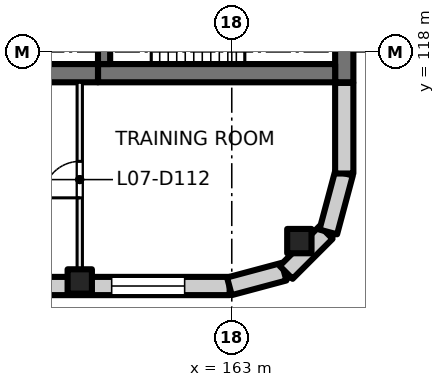
"""IFC4 building model, lengths in metres.
Left out: names, types, materials, properties, quantities, classifications, styles, units other than length and angle.
Written with IfcOpenShell. Run it as: python <this file> out.ifc"""

import sys

from ifc_helpers import new_model, si_unit, direction, frame, frame_2d, origin, origin_2d, place, context, subcontext, project, spatial, rectangle, extrude, element, fill, save


model = new_model("IFC4")
c1 = context("Model", 3, precision=1e-05, world=origin(), true_north=direction((0.0, 1.0)))
c2 = subcontext(c1, "Body", "Model", "MODEL_VIEW")
j1 = project(units=[si_unit("LENGTHUNIT", "METRE"), si_unit("PLANEANGLEUNIT", "RADIAN")], contexts=[c1])
p1 = place(None, origin())
s1 = spatial("IfcSite", under=j1, at=p1, CompositionType="ELEMENT")
p2 = place(p1, origin())
s2 = spatial("IfcBuilding", under=s1, at=p2, CompositionType="ELEMENT")
p3 = place(p2, frame((0.0, 0.0, 35.5)))
s3 = spatial("IfcBuildingStorey", under=s2, at=p3, CompositionType="ELEMENT", Elevation=35.5)
for number, where, z_axis, x_axis in (
    (1, (165.223, 111.777, 0.0), (0.0, 0.0, 1.0), (1.0, 0.0, 0.0)),
    (2, (158.0, 110.45, 0.0), (0.0, 0.0, 1.0), (1.0, 0.0, 0.0)),
):
    element("IfcColumn", number, at=place(p3, frame(where, z_axis=z_axis, x_axis=x_axis)), inside=s3, PredefinedType="COLUMN", context=c2, shape_type="SweptSolid", body=[
        extrude(rectangle(XDim=0.8, YDim=0.8, at=origin_2d()), origin(), (0.0, 0.0, 1.0), 4.0),
    ])
p4 = place(p3, frame((166.7, 120.8, 0.0), z_axis=(0.0, 0.0, 1.0), x_axis=(0.0, -1.0, 0.0)))
e3 = element("IfcWall", 3, at=p4, inside=s3, PredefinedType="SHEAR", context=c2, shape_type="SweptSolid", body=[
    extrude(rectangle(XDim=3.8, YDim=0.6, at=frame_2d((1.9, 0.0))), origin(), (0.0, 0.0, 1.0), 4.0),
])
p5 = place(p3, frame((166.4, 117.3, 0.0), z_axis=(0.0, 0.0, 1.0), x_axis=(-1.0, 0.0, 0.0)))
e4 = element("IfcWall", 4, at=p5, inside=s3, PredefinedType="SHEAR", context=c2, shape_type="SweptSolid", body=[
    extrude(rectangle(XDim=7.8, YDim=0.6, at=frame_2d((3.9, 0.0))), origin(), (0.0, 0.0, 1.0), 4.0),
])
p6 = place(p3, frame((158.6, 117.3, 0.0), z_axis=(0.0, 0.0, 1.0), x_axis=(-1.0, 0.0, 0.0)))
e5 = element("IfcWall", 5, at=p6, inside=s3, PredefinedType="SHEAR", context=c2, shape_type="SweptSolid", body=[
    extrude(rectangle(XDim=4.6, YDim=0.6, at=frame_2d((2.3, 0.0))), origin(), (0.0, 0.0, 1.0), 4.0),
])
p7 = place(p3, frame((158.8, 120.4, 0.0), z_axis=(0.0, 0.0, 1.0), x_axis=(0.0, -1.0, 0.0)))
e6 = element("IfcWall", 6, at=p7, inside=s3, PredefinedType="SHEAR", context=c2, shape_type="SweptSolid", body=[
    extrude(rectangle(XDim=2.8, YDim=0.4, at=frame_2d((1.4, 0.0))), origin(), (0.0, 0.0, 1.0), 4.0),
])
p8 = place(p7, frame((0.9, 0.0, 0.0)))
e7 = element("IfcOpeningElement", 7, at=p8, cuts=e6, PredefinedType="OPENING", context=c2, shape_type="SweptSolid", body=[
    extrude(rectangle(XDim=1.0, YDim=2.1, at=frame_2d((0.5, 1.05))), frame((0.0, 0.21, 0.0), z_axis=(0.0, -1.0, 0.0), x_axis=(1.0, 0.0, 0.0)), (0.0, 0.0, 1.0), 0.42),
])
p9 = place(p3, frame((162.93, 110.3, 0.0), z_axis=(0.0, 0.0, 1.0), x_axis=(-1.0, 0.0, 0.0)))
e8 = element("IfcWall", 8, at=p9, inside=s3, PredefinedType="SOLIDWALL", context=c2, shape_type="SweptSolid", body=[
    extrude(rectangle(XDim=31.93, YDim=0.6, at=frame_2d((15.965, 0.0))), origin(), (0.0, 0.0, 1.0), 3.625),
])
p10 = place(p9, frame((1.48, 0.0, 0.9)))
e9 = element("IfcOpeningElement", 9, at=p10, cuts=e8, PredefinedType="OPENING", context=c2, shape_type="SweptSolid", body=[
    extrude(rectangle(XDim=2.4, YDim=2.4, at=frame_2d((1.2, 1.2))), frame((0.0, 0.31, 0.0), z_axis=(0.0, -1.0, 0.0), x_axis=(1.0, 0.0, 0.0)), (0.0, 0.0, 1.0), 0.62),
])
p11 = place(p9, frame((5.98, 0.0, 0.9)))
e10 = element("IfcOpeningElement", 10, at=p11, cuts=e8, PredefinedType="OPENING", context=c2, shape_type="SweptSolid", body=[
    extrude(rectangle(XDim=2.4, YDim=2.4, at=frame_2d((1.2, 1.2))), frame((0.0, 0.31, 0.0), z_axis=(0.0, -1.0, 0.0), x_axis=(1.0, 0.0, 0.0)), (0.0, 0.0, 1.0), 0.62),
])
p12 = place(p9, frame((10.48, 0.0, 0.9)))
e11 = element("IfcOpeningElement", 11, at=p12, cuts=e8, PredefinedType="OPENING", context=c2, shape_type="SweptSolid", body=[
    extrude(rectangle(XDim=2.4, YDim=2.4, at=frame_2d((1.2, 1.2))), frame((0.0, 0.31, 0.0), z_axis=(0.0, -1.0, 0.0), x_axis=(1.0, 0.0, 0.0)), (0.0, 0.0, 1.0), 0.62),
])
p13 = place(p9, frame((14.98, 0.0, 0.9)))
e12 = element("IfcOpeningElement", 12, at=p13, cuts=e8, PredefinedType="OPENING", context=c2, shape_type="SweptSolid", body=[
    extrude(rectangle(XDim=2.4, YDim=2.4, at=frame_2d((1.2, 1.2))), frame((0.0, 0.31, 0.0), z_axis=(0.0, -1.0, 0.0), x_axis=(1.0, 0.0, 0.0)), (0.0, 0.0, 1.0), 0.62),
])
p14 = place(p9, frame((19.48, 0.0, 0.9)))
e13 = element("IfcOpeningElement", 13, at=p14, cuts=e8, PredefinedType="OPENING", context=c2, shape_type="SweptSolid", body=[
    extrude(rectangle(XDim=2.4, YDim=2.4, at=frame_2d((1.2, 1.2))), frame((0.0, 0.31, 0.0), z_axis=(0.0, -1.0, 0.0), x_axis=(1.0, 0.0, 0.0)), (0.0, 0.0, 1.0), 0.62),
])
p15 = place(p9, frame((23.98, 0.0, 0.9)))
e14 = element("IfcOpeningElement", 14, at=p15, cuts=e8, PredefinedType="OPENING", context=c2, shape_type="SweptSolid", body=[
    extrude(rectangle(XDim=2.4, YDim=2.4, at=frame_2d((1.2, 1.2))), frame((0.0, 0.31, 0.0), z_axis=(0.0, -1.0, 0.0), x_axis=(1.0, 0.0, 0.0)), (0.0, 0.0, 1.0), 0.62),
])
p16 = place(p9, frame((28.48, 0.0, 0.9)))
e15 = element("IfcOpeningElement", 15, at=p16, cuts=e8, PredefinedType="OPENING", context=c2, shape_type="SweptSolid", body=[
    extrude(rectangle(XDim=2.4, YDim=2.4, at=frame_2d((1.2, 1.2))), frame((0.0, 0.31, 0.0), z_axis=(0.0, -1.0, 0.0), x_axis=(1.0, 0.0, 0.0)), (0.0, 0.0, 1.0), 0.62),
])
for number, where, z_axis, x_axis in (
    (16, (164.719, 110.771, 0.0), (0.0, 0.0, 1.0), (-0.966, -0.259, 0.0)),
    (17, (166.104, 112.064, 0.0), (0.0, 0.0, 1.0), (-0.707, -0.707, 0.0)),
):
    element("IfcWall", number, at=place(p3, frame(where, z_axis=z_axis, x_axis=x_axis)), inside=s3, PredefinedType="SOLIDWALL", context=c2, shape_type="SweptSolid", body=[
        extrude(rectangle(XDim=1.861, YDim=0.6, at=frame_2d((0.93, 0.0))), origin(), (0.0, 0.0, 1.0), 3.625),
    ])
p17 = place(p3, frame((166.692, 114.01, 0.0), z_axis=(0.0, 0.0, 1.0), x_axis=(-0.258839784042, -0.965920269068, 0.0)))
e18 = element("IfcWall", 18, at=p17, inside=s3, PredefinedType="SOLIDWALL", context=c2, shape_type="SweptSolid", body=[
    extrude(rectangle(XDim=2.0, YDim=0.6, at=frame_2d((1.0, 0.0))), origin(), (0.0, 0.0, 1.0), 3.625),
])
p18 = place(p3, frame((166.7, 116.98, 0.0), z_axis=(0.0, 0.0, 1.0), x_axis=(0.0, -1.0, 0.0)))
e19 = element("IfcWall", 19, at=p18, inside=s3, PredefinedType="SOLIDWALL", context=c2, shape_type="SweptSolid", body=[
    extrude(rectangle(XDim=2.98, YDim=0.6, at=frame_2d((1.49, 0.0))), origin(), (0.0, 0.0, 1.0), 3.625),
])
p19 = place(p3, frame((158.0, 110.6, 0.0), z_axis=(0.0, 0.0, 1.0), x_axis=(0.0, 1.0, 0.0)))
e20 = element("IfcWall", 20, at=p19, inside=s3, PredefinedType="PARTITIONING", context=c2, shape_type="SweptSolid", body=[
    extrude(rectangle(XDim=6.4, YDim=0.175, at=frame_2d((3.2, 0.0))), origin(), (0.0, 0.0, 1.0), 3.625),
])
p20 = place(p19, frame((2.6, 0.0, 0.0)))
e21 = element("IfcOpeningElement", 21, at=p20, cuts=e20, PredefinedType="OPENING", context=c2, shape_type="SweptSolid", body=[
    extrude(rectangle(XDim=1.2, YDim=2.1, at=frame_2d((0.6, 1.05))), frame((0.0, 0.097, 0.0), z_axis=(0.0, -1.0, 0.0), x_axis=(1.0, 0.0, 0.0)), (0.0, 0.0, 1.0), 0.195),
])
p21 = place(p10, origin())
e22 = element("IfcWindow", 22, at=p21, inside=s3, PartitioningType="SINGLE_PANEL", PredefinedType="WINDOW", context=c2, shape_type="SweptSolid", body=[
    extrude(rectangle(XDim=2.4, YDim=2.4, at=frame_2d((1.2, 1.2))), frame((0.0, 0.03, 0.0), z_axis=(0.0, -1.0, 0.0), x_axis=(1.0, 0.0, 0.0)), (0.0, 0.0, 1.0), 0.06),
])
fill(e9, e22)
p22 = place(p20, origin())
e23 = element("IfcDoor", 23, at=p22, inside=s3, OperationType="DOUBLE_DOOR_SINGLE_SWING", PredefinedType="DOOR", context=c2, shape_type="SweptSolid", body=[
    extrude(rectangle(XDim=1.2, YDim=2.1, at=frame_2d((0.6, 1.05))), frame((0.0, 0.025, 0.0), z_axis=(0.0, -1.0, 0.0), x_axis=(1.0, 0.0, 0.0)), (0.0, 0.0, 1.0), 0.05),
])
fill(e21, e23)
save(model, sys.argv[1])
